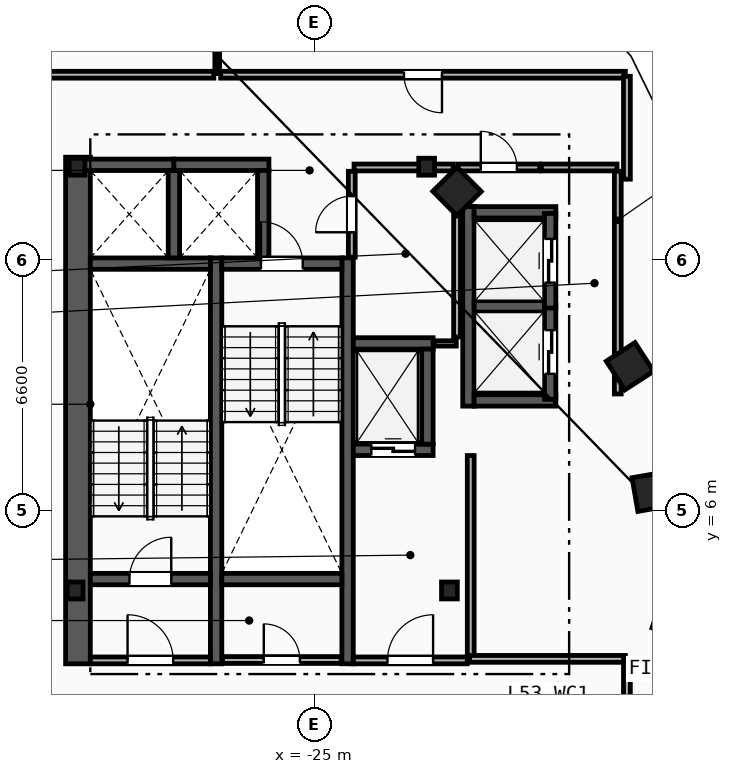
"""IFC4 building model, lengths in metres.
Left out: names, types, materials, properties, quantities, classifications, styles, units other than length and angle.
Written with IfcOpenShell. Run it as: python <this file> out.ifc"""

import sys

from ifc_helpers import new_model, si_unit, direction, frame, frame_2d, origin, origin_2d, place, context, subcontext, project, spatial, rectangle, i_section, extrude, element, fill, save


model = new_model("IFC4")
c1 = context("Model", 3, precision=1e-05, world=origin(), true_north=direction((0.0, 1.0)))
c2 = subcontext(c1, "Body", "Model", "MODEL_VIEW")
j1 = project(units=[si_unit("LENGTHUNIT", "METRE"), si_unit("PLANEANGLEUNIT", "RADIAN")], contexts=[c1])
p1 = place(None, origin())
s1 = spatial("IfcSite", under=j1, at=p1, CompositionType="ELEMENT")
p2 = place(p1, origin())
s2 = spatial("IfcBuilding", under=s1, at=p2, CompositionType="ELEMENT")
p3 = place(p2, frame((0.0, 0.0, 202.6)))
s3 = spatial("IfcBuildingStorey", under=s2, at=p3, CompositionType="ELEMENT", Elevation=202.6)
for number, where, z_axis, x_axis in (
    (1, (-31.3, 3.9, 0.0), (0.0, 0.0, 1.0), (1.0, 0.0, 0.0)),
    (2, (-21.45, 3.9, 0.0), (0.0, 0.0, 1.0), (1.0, 0.0, 0.0)),
    (3, (-22.05, 15.05, 0.0), (0.0, 0.0, 1.0), (1.0, 0.0, 0.0)),
    (4, (-31.25, 15.05, 0.0), (0.0, 0.0, 1.0), (1.0, 0.0, 0.0)),
):
    element("IfcColumn", number, at=place(p3, frame(where, z_axis=z_axis, x_axis=x_axis)), inside=s3, PredefinedType="COLUMN", context=c2, shape_type="SweptSolid", body=[
        extrude(i_section(OverallWidth=0.416, OverallDepth=0.446, WebThickness=0.039, FlangeThickness=0.063, FilletRadius=0.018, at=origin_2d()), origin(), (0.0, 0.0, 1.0), 3.6),
    ])
for number, where, z_axis, x_axis in (
    (5, (-15.55, 3.2, 0.0), (0.0, 0.0, 1.0), (0.315, 0.949, 0.0)),
    (6, (-16.125, 6.5, 0.0), (0.0, 0.0, 1.0), (-0.172, 0.985, 0.0)),
    (7, (-16.7, 9.8, 0.0), (0.0, 0.0, 1.0), (-0.544, 0.839, 0.0)),
    (8, (-21.25, 14.4, 0.0), (0.0, 0.0, 1.0), (-0.703, 0.711, 0.0)),
):
    element("IfcColumn", number, at=place(p3, frame(where, z_axis=z_axis, x_axis=x_axis)), inside=s3, PredefinedType="COLUMN", context=c2, shape_type="SweptSolid", body=[
        extrude(rectangle(XDim=0.9, YDim=0.9, at=origin_2d()), origin(), (0.0, 0.0, 1.0), 3.6),
    ])
p4 = place(p3, frame((-31.225, 1.97, 0.0), z_axis=(0.0, 0.0, 1.0), x_axis=(0.0, 1.0, 0.0)))
e9 = element("IfcWall", 9, at=p4, inside=s3, PredefinedType="SHEAR", context=c2, shape_type="SweptSolid", body=[
    extrude(rectangle(XDim=13.33, YDim=0.65, at=frame_2d((6.665, 0.0))), origin(), (0.0, 0.0, 1.0), 3.34),
])
for number, where, z_axis, x_axis in (
    (10, (-27.59, 1.97, 0.0), (0.0, 0.0, 1.0), (0.0, 1.0, 0.0)),
    (11, (-24.13, 1.97, 0.0), (0.0, 0.0, 1.0), (0.0, 1.0, 0.0)),
):
    element("IfcWall", number, at=place(p3, frame(where, z_axis=z_axis, x_axis=x_axis)), inside=s3, PredefinedType="SHEAR", context=c2, shape_type="SweptSolid", body=[
        extrude(rectangle(XDim=10.68, YDim=0.3, at=frame_2d((5.34, 0.0))), origin(), (0.0, 0.0, 1.0), 3.34),
    ])
p5 = place(p3, frame((-30.9, 4.2, 0.0), z_axis=(0.0, 0.0, 1.0), x_axis=(1.0, 0.0, 0.0)))
e12 = element("IfcWall", 12, at=p5, inside=s3, PredefinedType="SHEAR", context=c2, shape_type="SweptSolid", body=[
    extrude(rectangle(XDim=3.16, YDim=0.3, at=frame_2d((1.58, 0.0))), origin(), (0.0, 0.0, 1.0), 3.34),
])
p6 = place(p5, frame((1.03, 0.0, 0.0)))
e13 = element("IfcOpeningElement", 13, at=p6, cuts=e12, PredefinedType="OPENING", context=c2, shape_type="SweptSolid", body=[
    extrude(rectangle(XDim=1.1, YDim=2.15, at=frame_2d((0.55, 1.075))), frame((0.0, 0.16, 0.0), z_axis=(0.0, -1.0, 0.0), x_axis=(1.0, 0.0, 0.0)), (0.0, 0.0, 1.0), 0.32),
])
p7 = place(p3, frame((-30.9, 12.5, 0.0), z_axis=(0.0, 0.0, 1.0), x_axis=(1.0, 0.0, 0.0)))
e14 = element("IfcWall", 14, at=p7, inside=s3, PredefinedType="SHEAR", context=c2, shape_type="SweptSolid", body=[
    extrude(rectangle(XDim=3.16, YDim=0.3, at=frame_2d((1.58, 0.0))), origin(), (0.0, 0.0, 1.0), 3.34),
])
p8 = place(p3, frame((-27.44, 12.5, 0.0), z_axis=(0.0, 0.0, 1.0), x_axis=(1.0, 0.0, 0.0)))
e15 = element("IfcWall", 15, at=p8, inside=s3, PredefinedType="SHEAR", context=c2, shape_type="SweptSolid", body=[
    extrude(rectangle(XDim=3.16, YDim=0.3, at=frame_2d((1.58, 0.0))), origin(), (0.0, 0.0, 1.0), 3.34),
])
p9 = place(p8, frame((1.03, 0.0, 0.0)))
e16 = element("IfcOpeningElement", 16, at=p9, cuts=e15, PredefinedType="OPENING", context=c2, shape_type="SweptSolid", body=[
    extrude(rectangle(XDim=1.1, YDim=2.15, at=frame_2d((0.55, 1.075))), frame((0.0, 0.16, 0.0), z_axis=(0.0, -1.0, 0.0), x_axis=(1.0, 0.0, 0.0)), (0.0, 0.0, 1.0), 0.32),
])
p10 = place(p3, frame((-27.44, 4.2, 0.0), z_axis=(0.0, 0.0, 1.0), x_axis=(1.0, 0.0, 0.0)))
e17 = element("IfcWall", 17, at=p10, inside=s3, PredefinedType="SHEAR", context=c2, shape_type="SweptSolid", body=[
    extrude(rectangle(XDim=3.16, YDim=0.3, at=frame_2d((1.58, 0.0))), origin(), (0.0, 0.0, 1.0), 3.34),
])
p11 = place(p3, frame((-20.89, 2.15, 0.0), z_axis=(0.0, 0.0, 1.0), x_axis=(0.0, 1.0, 0.0)))
e18 = element("IfcWall", 18, at=p11, inside=s3, PredefinedType="PARTITIONING", context=c2, shape_type="SweptSolid", body=[
    extrude(rectangle(XDim=5.3, YDim=0.18, at=frame_2d((2.65, 0.0))), origin(), (0.0, 0.0, 1.0), 3.34),
])
p12 = place(p3, frame((-23.98, 2.06, 0.0), z_axis=(0.0, 0.0, 1.0), x_axis=(1.0, 0.0, 0.0)))
e19 = element("IfcWall", 19, at=p12, inside=s3, PredefinedType="PARTITIONING", context=c2, shape_type="SweptSolid", body=[
    extrude(rectangle(XDim=3.0, YDim=0.18, at=frame_2d((1.5, 0.0))), origin(), (0.0, 0.0, 1.0), 3.34),
])
p13 = place(p12, frame((0.9, 0.0, 0.0)))
e20 = element("IfcOpeningElement", 20, at=p13, cuts=e19, PredefinedType="OPENING", context=c2, shape_type="SweptSolid", body=[
    extrude(rectangle(XDim=1.2, YDim=2.15, at=frame_2d((0.6, 1.075))), frame((0.0, 0.1, 0.0), z_axis=(0.0, -1.0, 0.0), x_axis=(1.0, 0.0, 0.0)), (0.0, 0.0, 1.0), 0.2),
])
p14 = place(p3, frame((-30.9, 2.06, 0.0), z_axis=(0.0, 0.0, 1.0), x_axis=(1.0, 0.0, 0.0)))
e21 = element("IfcWall", 21, at=p14, inside=s3, PredefinedType="PARTITIONING", context=c2, shape_type="SweptSolid", body=[
    extrude(rectangle(XDim=3.16, YDim=0.18, at=frame_2d((1.58, 0.0))), origin(), (0.0, 0.0, 1.0), 3.34),
])
p15 = place(p14, frame((0.98, 0.0, 0.0)))
e22 = element("IfcOpeningElement", 22, at=p15, cuts=e21, PredefinedType="OPENING", context=c2, shape_type="SweptSolid", body=[
    extrude(rectangle(XDim=1.2, YDim=2.15, at=frame_2d((0.6, 1.075))), frame((0.0, 0.1, 0.0), z_axis=(0.0, -1.0, 0.0), x_axis=(1.0, 0.0, 0.0)), (0.0, 0.0, 1.0), 0.2),
])
p16 = place(p3, frame((-23.98, 7.6, 0.0), z_axis=(0.0, 0.0, 1.0), x_axis=(1.0, 0.0, 0.0)))
e23 = element("IfcWall", 23, at=p16, inside=s3, PredefinedType="SHEAR", context=c2, shape_type="SweptSolid", body=[
    extrude(rectangle(XDim=2.1, YDim=0.3, at=frame_2d((1.05, 0.0))), origin(), (0.0, 0.0, 1.0), 3.34),
])
p17 = place(p16, frame((0.475, 0.0, 0.0)))
e24 = element("IfcOpeningElement", 24, at=p17, cuts=e23, PredefinedType="OPENING", context=c2, shape_type="SweptSolid", body=[
    extrude(rectangle(XDim=1.15, YDim=2.2, at=frame_2d((0.575, 1.1))), frame((0.0, 0.16, 0.0), z_axis=(0.0, -1.0, 0.0), x_axis=(1.0, 0.0, 0.0)), (0.0, 0.0, 1.0), 0.32),
])
p18 = place(p3, frame((-23.98, 10.4, 0.0), z_axis=(0.0, 0.0, 1.0), x_axis=(1.0, 0.0, 0.0)))
e25 = element("IfcWall", 25, at=p18, inside=s3, PredefinedType="SHEAR", context=c2, shape_type="SweptSolid", body=[
    extrude(rectangle(XDim=2.1, YDim=0.3, at=frame_2d((1.05, 0.0))), origin(), (0.0, 0.0, 1.0), 3.34),
])
for number, where, z_axis, x_axis in (
    (26, (-22.03, 7.75, 0.0), (0.0, 0.0, 1.0), (0.0, 1.0, 0.0)),
    (27, (-31.2, 15.1, 0.0), (0.0, 0.0, 1.0), (1.0, 0.0, 0.0)),
):
    element("IfcWall", number, at=place(p3, frame(where, z_axis=z_axis, x_axis=x_axis)), inside=s3, PredefinedType="SHEAR", context=c2, shape_type="SweptSolid", body=[
        extrude(rectangle(XDim=2.5, YDim=0.3, at=frame_2d((1.25, 0.0))), origin(), (0.0, 0.0, 1.0), 3.34),
    ])
p19 = place(p3, frame((-28.7, 12.65, 0.0), z_axis=(0.0, 0.0, 1.0), x_axis=(0.0, 1.0, 0.0)))
e28 = element("IfcWall", 28, at=p19, inside=s3, PredefinedType="SHEAR", context=c2, shape_type="SweptSolid", body=[
    extrude(rectangle(XDim=2.3, YDim=0.3, at=frame_2d((1.15, 0.0))), origin(), (0.0, 0.0, 1.0), 3.34),
])
p20 = place(p3, frame((-28.7, 15.1, 0.0), z_axis=(0.0, 0.0, 1.0), x_axis=(1.0, 0.0, 0.0)))
e29 = element("IfcWall", 29, at=p20, inside=s3, PredefinedType="SHEAR", context=c2, shape_type="SweptSolid", body=[
    extrude(rectangle(XDim=2.5, YDim=0.3, at=frame_2d((1.25, 0.0))), origin(), (0.0, 0.0, 1.0), 3.34),
])
p21 = place(p3, frame((-26.35, 12.65, 0.0), z_axis=(0.0, 0.0, 1.0), x_axis=(0.0, 1.0, 0.0)))
e30 = element("IfcWall", 30, at=p21, inside=s3, PredefinedType="SHEAR", context=c2, shape_type="SweptSolid", body=[
    extrude(rectangle(XDim=2.3, YDim=0.3, at=frame_2d((1.15, 0.0))), origin(), (0.0, 0.0, 1.0), 3.34),
])
p22 = place(p3, frame((-20.95, 8.75, 0.0), z_axis=(0.0, 0.0, 1.0), x_axis=(0.0, 1.0, 0.0)))
e31 = element("IfcWall", 31, at=p22, inside=s3, PredefinedType="SHEAR", context=c2, shape_type="SweptSolid", body=[
    extrude(rectangle(XDim=5.25, YDim=0.3, at=frame_2d((2.625, 0.0))), origin(), (0.0, 0.0, 1.0), 3.34),
])
for number, where, z_axis, x_axis in (
    (32, (-20.8, 8.9, 0.0), (0.0, 0.0, 1.0), (1.0, 0.0, 0.0)),
    (33, (-20.8, 13.85, 0.0), (0.0, 0.0, 1.0), (1.0, 0.0, 0.0)),
):
    element("IfcWall", number, at=place(p3, frame(where, z_axis=z_axis, x_axis=x_axis)), inside=s3, PredefinedType="SHEAR", context=c2, shape_type="SweptSolid", body=[
        extrude(rectangle(XDim=2.15, YDim=0.3, at=frame_2d((1.075, 0.0))), origin(), (0.0, 0.0, 1.0), 3.34),
    ])
p23 = place(p3, frame((-20.8, 11.375, 0.0), z_axis=(0.0, 0.0, 1.0), x_axis=(1.0, 0.0, 0.0)))
e34 = element("IfcWall", 34, at=p23, inside=s3, PredefinedType="SHEAR", context=c2, shape_type="SweptSolid", body=[
    extrude(rectangle(XDim=1.85, YDim=0.3, at=frame_2d((0.925, 0.0))), origin(), (0.0, 0.0, 1.0), 3.34),
])
p24 = place(p3, frame((-18.8, 8.93, 0.0), z_axis=(0.0, 0.0, 1.0), x_axis=(0.0, 1.0, 0.0)))
e35 = element("IfcWall", 35, at=p24, inside=s3, PredefinedType="SHEAR", context=c2, shape_type="SweptSolid", body=[
    extrude(rectangle(XDim=2.49, YDim=0.3, at=frame_2d((1.245, 0.0))), origin(), (0.0, 0.0, 1.0), 3.34),
])
p25 = place(p24, frame((0.67, 0.0, 0.0)))
e36 = element("IfcOpeningElement", 36, at=p25, cuts=e35, PredefinedType="OPENING", context=c2, shape_type="SweptSolid", body=[
    extrude(rectangle(XDim=1.15, YDim=2.2, at=frame_2d((0.575, 1.1))), frame((0.0, 0.16, 0.0), z_axis=(0.0, -1.0, 0.0), x_axis=(1.0, 0.0, 0.0)), (0.0, 0.0, 1.0), 0.32),
])
p26 = place(p3, frame((-18.8, 11.33, 0.0), z_axis=(0.0, 0.0, 1.0), x_axis=(0.0, 1.0, 0.0)))
e37 = element("IfcWall", 37, at=p26, inside=s3, PredefinedType="SHEAR", context=c2, shape_type="SweptSolid", body=[
    extrude(rectangle(XDim=2.49, YDim=0.3, at=frame_2d((1.245, 0.0))), origin(), (0.0, 0.0, 1.0), 3.34),
])
p27 = place(p26, frame((0.67, 0.0, 0.0)))
e38 = element("IfcOpeningElement", 38, at=p27, cuts=e37, PredefinedType="OPENING", context=c2, shape_type="SweptSolid", body=[
    extrude(rectangle(XDim=1.15, YDim=2.2, at=frame_2d((0.575, 1.1))), frame((0.0, 0.16, 0.0), z_axis=(0.0, -1.0, 0.0), x_axis=(1.0, 0.0, 0.0)), (0.0, 0.0, 1.0), 0.32),
])
p28 = place(p3, frame((-17.02, 9.07, 0.0), z_axis=(0.0, 0.0, 1.0), x_axis=(0.0, 1.0, 0.0)))
e39 = element("IfcWall", 39, at=p28, inside=s3, PredefinedType="PARTITIONING", context=c2, shape_type="SweptSolid", body=[
    extrude(rectangle(XDim=5.86, YDim=0.18, at=frame_2d((2.93, 0.0))), origin(), (0.0, 0.0, 1.0), 3.34),
])
p29 = place(p3, frame((-21.23, 15.03, 0.0), z_axis=(0.0, 0.0, 1.0), x_axis=(1.0, 0.0, 0.0)))
e40 = element("IfcWall", 40, at=p29, inside=s3, PredefinedType="PARTITIONING", context=c2, shape_type="SweptSolid", body=[
    extrude(rectangle(XDim=2.16, YDim=0.18, at=frame_2d((1.08, 0.0))), origin(), (0.0, 0.0, 1.0), 3.34),
])
p30 = place(p29, frame((0.605, 0.0, 0.0)))
e41 = element("IfcOpeningElement", 41, at=p30, cuts=e40, PredefinedType="OPENING", context=c2, shape_type="SweptSolid", body=[
    extrude(rectangle(XDim=0.95, YDim=2.1, at=frame_2d((0.475, 1.05))), frame((0.0, 0.1, 0.0), z_axis=(0.0, -1.0, 0.0), x_axis=(1.0, 0.0, 0.0)), (0.0, 0.0, 1.0), 0.2),
])
p31 = place(p3, frame((-19.03, 15.03, 0.0), z_axis=(0.0, 0.0, 1.0), x_axis=(1.0, 0.0, 0.0)))
e42 = element("IfcWall", 42, at=p31, inside=s3, PredefinedType="PARTITIONING", context=c2, shape_type="SweptSolid", body=[
    extrude(rectangle(XDim=1.99, YDim=0.18, at=frame_2d((0.995, 0.0))), origin(), (0.0, 0.0, 1.0), 3.34),
])
p32 = place(p3, frame((-21.86, 10.4, 0.0), z_axis=(0.0, 0.0, 1.0), x_axis=(1.0, 0.0, 0.0)))
e43 = element("IfcWall", 43, at=p32, inside=s3, PredefinedType="PARTITIONING", context=c2, shape_type="SweptSolid", body=[
    extrude(rectangle(XDim=0.59, YDim=0.14, at=frame_2d((0.295, 0.0))), origin(), (0.0, 0.0, 1.0), 3.34),
])
p33 = place(p3, frame((-21.25, 10.57, 0.0), z_axis=(0.0, 0.0, 1.0), x_axis=(0.0, 1.0, 0.0)))
e44 = element("IfcWall", 44, at=p33, inside=s3, PredefinedType="PARTITIONING", context=c2, shape_type="SweptSolid", body=[
    extrude(rectangle(XDim=4.36, YDim=0.18, at=frame_2d((2.18, 0.0))), origin(), (0.0, 0.0, 1.0), 3.34),
])
p34 = place(p3, frame((-23.96, 15.03, 0.0), z_axis=(0.0, 0.0, 1.0), x_axis=(1.0, 0.0, 0.0)))
e45 = element("IfcWall", 45, at=p34, inside=s3, PredefinedType="PARTITIONING", context=c2, shape_type="SweptSolid", body=[
    extrude(rectangle(XDim=2.61, YDim=0.18, at=frame_2d((1.305, 0.0))), origin(), (0.0, 0.0, 1.0), 2.413),
])
p35 = place(p3, frame((-27.42, 2.07, 0.0), z_axis=(0.0, 0.0, 1.0), x_axis=(1.0, 0.0, 0.0)))
e46 = element("IfcWall", 46, at=p35, inside=s3, PredefinedType="PARTITIONING", context=c2, shape_type="SweptSolid", body=[
    extrude(rectangle(XDim=3.12, YDim=0.18, at=frame_2d((1.56, 0.0))), origin(), (0.0, 0.0, 1.0), 3.34),
])
p36 = place(p35, frame((1.085, 0.0, 0.0)))
e47 = element("IfcOpeningElement", 47, at=p36, cuts=e46, PredefinedType="OPENING", context=c2, shape_type="SweptSolid", body=[
    extrude(rectangle(XDim=0.95, YDim=2.1, at=frame_2d((0.475, 1.05))), frame((0.0, 0.1, 0.0), z_axis=(0.0, -1.0, 0.0), x_axis=(1.0, 0.0, 0.0)), (0.0, 0.0, 1.0), 0.2),
])
p37 = place(p3, frame((-24.02, 12.67, 0.0), z_axis=(0.0, 0.0, 1.0), x_axis=(0.0, 1.0, 0.0)))
e48 = element("IfcWall", 48, at=p37, inside=s3, PredefinedType="PARTITIONING", context=c2, shape_type="SweptSolid", body=[
    extrude(rectangle(XDim=2.26, YDim=0.18, at=frame_2d((1.13, 0.0))), origin(), (0.0, 0.0, 1.0), 3.34),
])
p38 = place(p37, frame((0.655, 0.0, 0.0)))
e49 = element("IfcOpeningElement", 49, at=p38, cuts=e48, PredefinedType="OPENING", context=c2, shape_type="SweptSolid", body=[
    extrude(rectangle(XDim=0.95, YDim=2.1, at=frame_2d((0.475, 1.05))), frame((0.0, 0.1, 0.0), z_axis=(0.0, -1.0, 0.0), x_axis=(1.0, 0.0, 0.0)), (0.0, 0.0, 1.0), 0.2),
])
p39 = place(p3, frame((-27.56, 17.5, 0.0), z_axis=(0.0, 0.0, 1.0), x_axis=(0.0, 1.0, 0.0)))
e50 = element("IfcWall", 50, at=p39, inside=s3, PredefinedType="PARTITIONING", context=c2, shape_type="SweptSolid", body=[
    extrude(rectangle(XDim=7.233, YDim=0.125, at=frame_2d((3.617, 0.0))), origin(), (0.0, 0.0, 1.0), 3.34),
])
p40 = place(p3, frame((-16.822, 17.47, 0.0), z_axis=(0.0, 0.0, 1.0), x_axis=(-1.0, 0.0, 0.0)))
e51 = element("IfcWall", 51, at=p40, inside=s3, PredefinedType="PARTITIONING", context=c2, shape_type="SweptSolid", body=[
    extrude(rectangle(XDim=10.648, YDim=0.18, at=frame_2d((5.324, 0.0))), origin(), (0.0, 0.0, 1.0), 3.34),
])
p41 = place(p40, frame((4.824, 0.0, 0.0)))
e52 = element("IfcOpeningElement", 52, at=p41, cuts=e51, PredefinedType="OPENING", context=c2, shape_type="SweptSolid", body=[
    extrude(rectangle(XDim=1.0, YDim=2.15, at=frame_2d((0.5, 1.075))), frame((0.0, 0.1, 0.0), z_axis=(0.0, -1.0, 0.0), x_axis=(1.0, 0.0, 0.0)), (0.0, 0.0, 1.0), 0.2),
])
p42 = place(p3, frame((-16.822, 2.1, 0.0), z_axis=(0.0, 0.0, 1.0), x_axis=(-1.0, 0.0, 0.0)))
e53 = element("IfcWall", 53, at=p42, inside=s3, PredefinedType="PARTITIONING", context=c2, shape_type="SweptSolid", body=[
    extrude(rectangle(XDim=4.098, YDim=0.18, at=frame_2d((2.049, 0.0))), origin(), (0.0, 0.0, 1.0), 3.34),
])
p43 = place(p3, frame((-16.78, 14.721, 0.0), z_axis=(0.0, 0.0, 1.0), x_axis=(0.0, 1.0, 0.0)))
e54 = element("IfcWall", 54, at=p43, inside=s3, PredefinedType="PARTITIONING", context=c2, shape_type="SweptSolid", body=[
    extrude(rectangle(XDim=2.707, YDim=0.18, at=frame_2d((1.354, 0.0))), origin(), (0.0, 0.0, 1.0), 3.34),
])
p44 = place(p3, frame((-16.78, -0.329, 0.0), z_axis=(0.0, 0.0, 1.0), x_axis=(0.0, 1.0, 0.0)))
e55 = element("IfcWall", 55, at=p44, inside=s3, PredefinedType="PARTITIONING", context=c2, shape_type="SweptSolid", body=[
    extrude(rectangle(XDim=2.387, YDim=0.18, at=frame_2d((1.194, 0.0))), origin(), (0.0, 0.0, 1.0), 3.34),
])
p45 = place(p3, frame((-27.65, 17.47, 0.0), z_axis=(0.0, 0.0, 1.0), x_axis=(-1.0, 0.0, 0.0)))
e56 = element("IfcWall", 56, at=p45, inside=s3, PredefinedType="PARTITIONING", context=c2, shape_type="SweptSolid", body=[
    extrude(rectangle(XDim=5.979, YDim=0.18, at=frame_2d((2.989, 0.0))), origin(), (0.0, 0.0, 1.0), 3.34),
])
p46 = place(p6, origin())
e57 = element("IfcDoor", 57, at=p46, inside=s3, OperationType="SINGLE_SWING_RIGHT", PredefinedType="DOOR", context=c2, shape_type="SweptSolid", body=[
    extrude(rectangle(XDim=1.1, YDim=2.15, at=frame_2d((0.55, 1.075))), frame((0.0, 0.025, 0.0), z_axis=(0.0, -1.0, 0.0), x_axis=(1.0, 0.0, 0.0)), (0.0, 0.0, 1.0), 0.05),
])
fill(e13, e57)
p47 = place(p9, origin())
e58 = element("IfcDoor", 58, at=p47, inside=s3, OperationType="SINGLE_SWING_LEFT", PredefinedType="DOOR", context=c2, shape_type="SweptSolid", body=[
    extrude(rectangle(XDim=1.1, YDim=2.15, at=frame_2d((0.55, 1.075))), frame((0.0, 0.025, 0.0), z_axis=(0.0, -1.0, 0.0), x_axis=(1.0, 0.0, 0.0)), (0.0, 0.0, 1.0), 0.05),
])
fill(e16, e58)
p48 = place(p13, origin())
e59 = element("IfcDoor", 59, at=p48, inside=s3, OperationType="SINGLE_SWING_RIGHT", PredefinedType="DOOR", context=c2, shape_type="SweptSolid", body=[
    extrude(rectangle(XDim=1.2, YDim=2.15, at=frame_2d((0.6, 1.075))), frame((0.0, 0.025, 0.0), z_axis=(0.0, -1.0, 0.0), x_axis=(1.0, 0.0, 0.0)), (0.0, 0.0, 1.0), 0.05),
])
fill(e20, e59)
p49 = place(p15, origin())
e60 = element("IfcDoor", 60, at=p49, inside=s3, OperationType="SINGLE_SWING_LEFT", PredefinedType="DOOR", context=c2, shape_type="SweptSolid", body=[
    extrude(rectangle(XDim=1.2, YDim=2.15, at=frame_2d((0.6, 1.075))), frame((0.0, 0.025, 0.0), z_axis=(0.0, -1.0, 0.0), x_axis=(1.0, 0.0, 0.0)), (0.0, 0.0, 1.0), 0.05),
])
fill(e22, e60)
p50 = place(p17, origin())
e61 = element("IfcDoor", 61, at=p50, inside=s3, OperationType="SLIDING_TO_LEFT", PredefinedType="TRAPDOOR", context=c2, shape_type="SweptSolid", body=[
    extrude(rectangle(XDim=1.15, YDim=2.2, at=frame_2d((0.575, 1.1))), frame((0.0, 0.025, 0.0), z_axis=(0.0, -1.0, 0.0), x_axis=(1.0, 0.0, 0.0)), (0.0, 0.0, 1.0), 0.05),
])
fill(e24, e61)
p51 = place(p25, origin())
e62 = element("IfcDoor", 62, at=p51, inside=s3, OperationType="SLIDING_TO_LEFT", PredefinedType="TRAPDOOR", context=c2, shape_type="SweptSolid", body=[
    extrude(rectangle(XDim=1.15, YDim=2.2, at=frame_2d((0.575, 1.1))), frame((0.0, 0.025, 0.0), z_axis=(0.0, -1.0, 0.0), x_axis=(1.0, 0.0, 0.0)), (0.0, 0.0, 1.0), 0.05),
])
fill(e36, e62)
p52 = place(p27, origin())
e63 = element("IfcDoor", 63, at=p52, inside=s3, OperationType="SLIDING_TO_LEFT", PredefinedType="TRAPDOOR", context=c2, shape_type="SweptSolid", body=[
    extrude(rectangle(XDim=1.15, YDim=2.2, at=frame_2d((0.575, 1.1))), frame((0.0, 0.025, 0.0), z_axis=(0.0, -1.0, 0.0), x_axis=(1.0, 0.0, 0.0)), (0.0, 0.0, 1.0), 0.05),
])
fill(e38, e63)
p53 = place(p41, origin())
e64 = element("IfcDoor", 64, at=p53, inside=s3, OperationType="SINGLE_SWING_LEFT", PredefinedType="DOOR", context=c2, shape_type="SweptSolid", body=[
    extrude(rectangle(XDim=1.0, YDim=2.15, at=frame_2d((0.5, 1.075))), frame((0.0, 0.025, 0.0), z_axis=(0.0, -1.0, 0.0), x_axis=(1.0, 0.0, 0.0)), (0.0, 0.0, 1.0), 0.05),
])
fill(e52, e64)
p54 = place(p36, origin())
e65 = element("IfcDoor", 65, at=p54, inside=s3, OperationType="SINGLE_SWING_LEFT", PredefinedType="DOOR", context=c2, shape_type="SweptSolid", body=[
    extrude(rectangle(XDim=0.95, YDim=2.1, at=frame_2d((0.475, 1.05))), frame((0.0, 0.025, 0.0), z_axis=(0.0, -1.0, 0.0), x_axis=(1.0, 0.0, 0.0)), (0.0, 0.0, 1.0), 0.05),
])
fill(e47, e65)
p55 = place(p38, origin())
e66 = element("IfcDoor", 66, at=p55, inside=s3, OperationType="SINGLE_SWING_LEFT", PredefinedType="DOOR", context=c2, shape_type="SweptSolid", body=[
    extrude(rectangle(XDim=0.95, YDim=2.1, at=frame_2d((0.475, 1.05))), frame((0.0, 0.025, 0.0), z_axis=(0.0, -1.0, 0.0), x_axis=(1.0, 0.0, 0.0)), (0.0, 0.0, 1.0), 0.05),
])
fill(e49, e66)
p56 = place(p30, origin())
e67 = element("IfcDoor", 67, at=p56, inside=s3, OperationType="SINGLE_SWING_LEFT", PredefinedType="DOOR", context=c2, shape_type="SweptSolid", body=[
    extrude(rectangle(XDim=0.95, YDim=2.1, at=frame_2d((0.475, 1.05))), frame((0.0, 0.025, 0.0), z_axis=(0.0, -1.0, 0.0), x_axis=(1.0, 0.0, 0.0)), (0.0, 0.0, 1.0), 0.05),
])
fill(e41, e67)
save(model, sys.argv[1])
